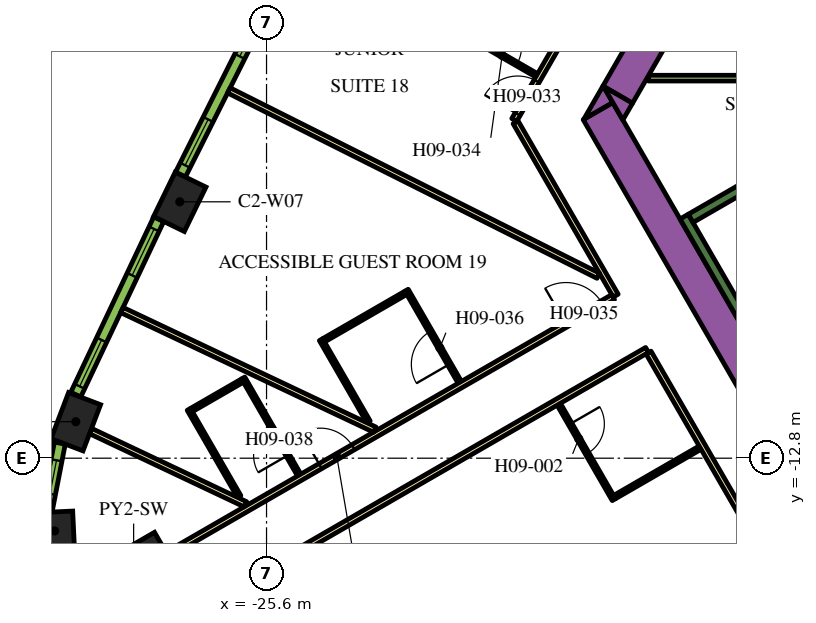
"""IFC4 building model, lengths in metres.
Left out: names, types, materials, properties, quantities, classifications, styles, units other than length and angle.
Written with IfcOpenShell. Run it as: python <this file> out.ifc"""

import sys

from ifc_helpers import new_model, si_unit, direction, frame, frame_2d, origin, origin_2d, place, context, subcontext, project, spatial, polyline, rectangle, outline, extrude, element, fill, save


model = new_model("IFC4")
c1 = context("Model", 3, precision=1e-05, world=origin(), true_north=direction((0.0, 1.0)))
c2 = subcontext(c1, "Body", "Model", "MODEL_VIEW")
j1 = project(units=[si_unit("LENGTHUNIT", "METRE"), si_unit("PLANEANGLEUNIT", "RADIAN")], contexts=[c1])
p1 = place(None, origin())
s1 = spatial("IfcSite", under=j1, at=p1, CompositionType="ELEMENT")
p2 = place(p1, origin())
s2 = spatial("IfcBuilding", under=s1, at=p2, CompositionType="ELEMENT")
p3 = place(p2, frame((0.0, 0.0, 126.6)))
s3 = spatial("IfcBuildingStorey", under=s2, at=p3, CompositionType="ELEMENT", Elevation=126.6)
p4 = place(p3, frame((-29.097, -16.799, 0.0), z_axis=(0.0, 0.0, 1.0), x_axis=(-0.866025403784, -0.5, 0.0)))
e1 = element("IfcColumn", 1, at=p4, inside=s3, PredefinedType="COLUMN", context=c2, shape_type="SweptSolid", body=[
    extrude(rectangle(XDim=3.0, YDim=3.0, at=origin_2d()), origin(), (0.0, 0.0, 1.0), 3.9),
])
for number, where, z_axis, x_axis in (
    (2, (-27.883, -6.054, 0.0), (0.0, 0.0, 1.0), (-0.438, -0.899, 0.0)),
    (3, (-30.619, -11.839, 0.0), (0.0, 0.0, 1.0), (-0.355, -0.935, 0.0)),
):
    element("IfcColumn", number, at=place(p3, frame(where, z_axis=z_axis, x_axis=x_axis)), inside=s3, PredefinedType="COLUMN", context=c2, shape_type="SweptSolid", body=[
        extrude(rectangle(XDim=1.3, YDim=0.9, at=origin_2d()), origin(), (0.0, 0.0, 1.0), 3.9),
    ])
p5 = place(p3, frame((-31.177, -14.714, 0.0), z_axis=(0.0, 0.0, 1.0), x_axis=(0.046756026083, -0.998906338965, 0.0)))
e4 = element("IfcColumn", 4, at=p5, inside=s3, PredefinedType="COLUMN", context=c2, shape_type="SweptSolid", body=[
    extrude(rectangle(XDim=1.0, YDim=1.0, at=origin_2d()), origin(), (0.0, 0.0, 1.0), 3.9),
])
p6 = place(p3, frame((-12.134, -11.883, 0.0), z_axis=(0.0, 0.0, 1.0), x_axis=(-0.500005339912, 0.866022320763, 0.0)))
e5 = element("IfcWall", 5, at=p6, inside=s3, PredefinedType="SOLIDWALL", context=c2, shape_type="SweptSolid", body=[
    extrude(rectangle(XDim=9.488, YDim=0.9, at=frame_2d((4.744, 0.0))), origin(), (0.0, 0.0, 1.0), 3.9),
])
p7 = place(p3, origin())
e6 = element("IfcWall", 6, at=p7, inside=s3, PredefinedType="SOLIDWALL", context=c2, shape_type="SweptSolid", body=[
    extrude(outline(polyline([(-16.489, -3.44), (-17.251, -3.88), (-16.743, -3.0), (-16.489, -3.44)])), origin(), (0.0, 0.0, 1.0), 3.9),
])
p8 = place(p3, frame((-15.118, -1.085, 0.0), z_axis=(0.0, 0.0, 1.0), x_axis=(-0.50006606081, -0.865987260198, 0.0)))
e7 = element("IfcWall", 7, at=p8, inside=s3, PredefinedType="SOLIDWALL", context=c2, shape_type="SweptSolid", body=[
    extrude(rectangle(XDim=2.481, YDim=0.9, at=frame_2d((1.24, 0.0))), origin(), (0.0, 0.0, 1.0), 3.9),
])
e8 = element("IfcWall", 8, at=p7, inside=s3, PredefinedType="SOLIDWALL", context=c2, shape_type="SweptSolid", body=[
    extrude(outline(polyline([(-16.223, -3.9), (-16.732, -3.02), (-15.969, -3.46), (-16.223, -3.9)])), origin(), (0.0, 0.0, 1.0), 3.9),
])
p9 = place(p3, frame((-12.885, -9.431, 0.0), z_axis=(0.0, 0.0, 1.0), x_axis=(-0.500020560727, 0.866013532718, 0.0)))
e9 = element("IfcWall", 9, at=p9, inside=s3, PredefinedType="SOLIDWALL", context=c2, shape_type="SweptSolid", body=[
    extrude(rectangle(XDim=3.45, YDim=0.25, at=frame_2d((1.725, 0.0))), origin(), (0.0, 0.0, 1.0), 3.9),
])
p10 = place(p3, frame((-14.44, -6.49, 0.0), z_axis=(0.0, 0.0, 1.0), x_axis=(0.866022966069, 0.500004222222, 0.0)))
e10 = element("IfcWall", 10, at=p10, inside=s3, PredefinedType="SOLIDWALL", context=c2, shape_type="SweptSolid", body=[
    extrude(rectangle(XDim=6.8, YDim=0.25, at=frame_2d((3.4, 0.0))), origin(), (0.0, 0.0, 1.0), 3.9),
])
p11 = place(p3, frame((-12.915, -2.8, 0.0), z_axis=(0.0, 0.0, 1.0), x_axis=(-1.0, 0.0, 0.0)))
e11 = element("IfcWall", 11, at=p11, inside=s3, PredefinedType="PARTITIONING", context=c2, shape_type="SweptSolid", body=[
    extrude(rectangle(XDim=2.637, YDim=0.15, at=frame_2d((1.318, 0.0))), origin(), (0.0, 0.0, 1.0), 2.75),
])
p12 = place(p3, frame((-19.081, -3.9, 0.0), z_axis=(0.0, 0.0, 1.0), x_axis=(0.499998313975, 0.866026377209, 0.0)))
e12 = element("IfcWall", 12, at=p12, inside=s3, PredefinedType="PARTITIONING", context=c2, shape_type="SweptSolid", body=[
    extrude(rectangle(XDim=25.766, YDim=0.15, at=frame_2d((12.883, 0.0))), origin(), (0.0, 0.0, 1.0), 2.75),
])
p13 = place(p12, frame((19.306, 0.0, 0.0)))
e13 = element("IfcOpeningElement", 13, at=p13, cuts=e12, PredefinedType="OPENING", context=c2, shape_type="SweptSolid", body=[
    extrude(rectangle(XDim=1.0, YDim=2.1, at=frame_2d((0.5, 1.05))), frame((0.0, 0.085, 0.0), z_axis=(0.0, -1.0, 0.0), x_axis=(1.0, 0.0, 0.0)), (0.0, 0.0, 1.0), 0.17),
])
p14 = place(p12, frame((18.0, 0.0, 0.0)))
e14 = element("IfcOpeningElement", 14, at=p14, cuts=e12, PredefinedType="OPENING", context=c2, shape_type="SweptSolid", body=[
    extrude(rectangle(XDim=1.0, YDim=2.1, at=frame_2d((0.5, 1.05))), frame((0.0, 0.085, 0.0), z_axis=(0.0, -1.0, 0.0), x_axis=(1.0, 0.0, 0.0)), (0.0, 0.0, 1.0), 0.17),
])
p15 = place(p12, frame((7.793, 0.0, 0.0)))
e15 = element("IfcOpeningElement", 15, at=p15, cuts=e12, PredefinedType="OPENING", context=c2, shape_type="SweptSolid", body=[
    extrude(rectangle(XDim=0.9, YDim=2.1, at=frame_2d((0.45, 1.05))), frame((0.0, 0.085, 0.0), z_axis=(0.0, -1.0, 0.0), x_axis=(1.0, 0.0, 0.0)), (0.0, 0.0, 1.0), 0.17),
])
p16 = place(p12, frame((4.674, 0.0, 0.0)))
e16 = element("IfcOpeningElement", 16, at=p16, cuts=e12, PredefinedType="OPENING", context=c2, shape_type="SweptSolid", body=[
    extrude(rectangle(XDim=0.9, YDim=2.1, at=frame_2d((0.45, 1.05))), frame((0.0, 0.085, 0.0), z_axis=(0.0, -1.0, 0.0), x_axis=(1.0, 0.0, 0.0)), (0.0, 0.0, 1.0), 0.17),
])
p17 = place(p12, frame((0.18, 0.0, 0.0)))
e17 = element("IfcOpeningElement", 17, at=p17, cuts=e12, PredefinedType="OPENING", context=c2, shape_type="SweptSolid", body=[
    extrude(rectangle(XDim=1.0, YDim=2.1, at=frame_2d((0.5, 1.05))), frame((0.0, 0.085, 0.0), z_axis=(0.0, -1.0, 0.0), x_axis=(1.0, 0.0, 0.0)), (0.0, 0.0, 1.0), 0.17),
])
p18 = place(p3, frame((-16.412, -8.523, 0.0), z_axis=(0.0, 0.0, 1.0), x_axis=(-0.500001929737, 0.866024289647, 0.0)))
e18 = element("IfcWall", 18, at=p18, inside=s3, PredefinedType="PARTITIONING", context=c2, shape_type="SweptSolid", body=[
    extrude(rectangle(XDim=5.268, YDim=0.15, at=frame_2d((2.634, 0.0))), origin(), (0.0, 0.0, 1.0), 2.75),
])
p19 = place(p3, frame((-28.211, -15.335, 0.0), z_axis=(0.0, 0.0, 1.0), x_axis=(0.866025884867, 0.49999916674, 0.0)))
e19 = element("IfcWall", 19, at=p19, inside=s3, PredefinedType="PARTITIONING", context=c2, shape_type="SweptSolid", body=[
    extrude(rectangle(XDim=13.543, YDim=0.15, at=frame_2d((6.772, 0.0))), origin(), (0.0, 0.0, 1.0), 2.75),
])
p20 = place(p19, frame((12.114, 0.0, 0.0)))
e20 = element("IfcOpeningElement", 20, at=p20, cuts=e19, PredefinedType="OPENING", context=c2, shape_type="SweptSolid", body=[
    extrude(rectangle(XDim=1.1, YDim=2.1, at=frame_2d((0.55, 1.05))), frame((0.0, 0.085, 0.0), z_axis=(0.0, -1.0, 0.0), x_axis=(1.0, 0.0, 0.0)), (0.0, 0.0, 1.0), 0.17),
])
p21 = place(p19, frame((4.65, 0.0, 0.0)))
e21 = element("IfcOpeningElement", 21, at=p21, cuts=e19, PredefinedType="OPENING", context=c2, shape_type="SweptSolid", body=[
    extrude(rectangle(XDim=1.0, YDim=2.1, at=frame_2d((0.5, 1.05))), frame((0.0, 0.085, 0.0), z_axis=(0.0, -1.0, 0.0), x_axis=(1.0, 0.0, 0.0)), (0.0, 0.0, 1.0), 0.17),
])
p22 = place(p3, frame((-15.587, -9.952, 0.0), z_axis=(0.0, 0.0, 1.0), x_axis=(-0.866017869832, -0.500013048961, 0.0)))
e22 = element("IfcWall", 22, at=p22, inside=s3, PredefinedType="PARTITIONING", context=c2, shape_type="SweptSolid", body=[
    extrude(rectangle(XDim=13.624, YDim=0.15, at=frame_2d((6.812, 0.0))), origin(), (0.0, 0.0, 1.0), 2.75),
])
p23 = place(p22, frame((12.344, 0.0, 0.0)))
e23 = element("IfcOpeningElement", 23, at=p23, cuts=e22, PredefinedType="OPENING", context=c2, shape_type="SweptSolid", body=[
    extrude(rectangle(XDim=1.1, YDim=2.1, at=frame_2d((0.55, 1.05))), frame((0.0, 0.085, 0.0), z_axis=(0.0, -1.0, 0.0), x_axis=(1.0, 0.0, 0.0)), (0.0, 0.0, 1.0), 0.17),
])
p24 = place(p3, frame((-12.918, -14.575, 0.0), z_axis=(0.0, 0.0, 1.0), x_axis=(-0.500009150678, 0.866020120573, 0.0)))
e24 = element("IfcWall", 24, at=p24, inside=s3, PredefinedType="PARTITIONING", context=c2, shape_type="SweptSolid", body=[
    extrude(rectangle(XDim=5.258, YDim=0.15, at=frame_2d((2.629, 0.0))), origin(), (0.0, 0.0, 1.0), 2.75),
])
p25 = place(p3, frame((-30.231, -12.085, 0.0), z_axis=(0.0, 0.0, 1.0), x_axis=(0.904001132572, -0.427530060122, 0.0)))
e25 = element("IfcWall", 25, at=p25, inside=s3, PredefinedType="PARTITIONING", context=c2, shape_type="SweptSolid", body=[
    extrude(rectangle(XDim=4.51, YDim=0.15, at=frame_2d((2.255, 0.0))), origin(), (0.0, 0.0, 1.0), 2.75),
])
p26 = place(p3, frame((-29.406, -8.901, 0.0), z_axis=(0.0, 0.0, 1.0), x_axis=(0.904002363742, -0.427527456836, 0.0)))
e26 = element("IfcWall", 26, at=p26, inside=s3, PredefinedType="PARTITIONING", context=c2, shape_type="SweptSolid", body=[
    extrude(rectangle(XDim=7.362, YDim=0.15, at=frame_2d((3.681, 0.0))), origin(), (0.0, 0.0, 1.0), 2.75),
])
p27 = place(p3, frame((-26.591, -3.122, 0.0), z_axis=(0.0, 0.0, 1.0), x_axis=(0.893766213273, -0.448533115847, 0.0)))
e27 = element("IfcWall", 27, at=p27, inside=s3, PredefinedType="PARTITIONING", context=c2, shape_type="SweptSolid", body=[
    extrude(rectangle(XDim=10.875, YDim=0.15, at=frame_2d((5.438, 0.0))), origin(), (0.0, 0.0, 1.0), 2.75),
])
p28 = place(p3, frame((-17.91, -11.38, 0.0), z_axis=(0.0, 0.0, 1.0), x_axis=(0.499987231761, -0.866032775405, 0.0)))
e28 = element("IfcWall", 28, at=p28, inside=s3, PredefinedType="PARTITIONING", context=c2, shape_type="SweptSolid", body=[
    extrude(rectangle(XDim=2.9, YDim=0.1, at=frame_2d((1.45, 0.0))), origin(), (0.0, 0.0, 1.0), 2.75),
])
p29 = place(p28, frame((0.6, 0.0, 0.0)))
e29 = element("IfcOpeningElement", 29, at=p29, cuts=e28, PredefinedType="OPENING", context=c2, shape_type="SweptSolid", body=[
    extrude(rectangle(XDim=0.9, YDim=2.1, at=frame_2d((0.45, 1.05))), frame((0.0, 0.06, 0.0), z_axis=(0.0, -1.0, 0.0), x_axis=(1.0, 0.0, 0.0)), (0.0, 0.0, 1.0), 0.12),
])
p30 = place(p3, frame((-16.442, -13.823, 0.0), z_axis=(0.0, 0.0, 1.0), x_axis=(0.866021400173, 0.500006934395, 0.0)))
e30 = element("IfcWall", 30, at=p30, inside=s3, PredefinedType="PARTITIONING", context=c2, shape_type="SweptSolid", body=[
    extrude(rectangle(XDim=2.6, YDim=0.1, at=frame_2d((1.3, 0.0))), origin(), (0.0, 0.0, 1.0), 2.75),
])
p31 = place(p3, frame((-20.829, -1.377, 0.0), z_axis=(0.0, 0.0, 1.0), x_axis=(0.866036505625, -0.499980770555, 0.0)))
e31 = element("IfcWall", 31, at=p31, inside=s3, PredefinedType="PARTITIONING", context=c2, shape_type="SweptSolid", body=[
    extrude(rectangle(XDim=2.7, YDim=0.1, at=frame_2d((1.35, 0.0))), origin(), (0.0, 0.0, 1.0), 2.75),
])
p32 = place(p31, frame((1.2, 0.0, 0.0)))
e32 = element("IfcOpeningElement", 32, at=p32, cuts=e31, PredefinedType="OPENING", context=c2, shape_type="SweptSolid", body=[
    extrude(rectangle(XDim=0.9, YDim=2.1, at=frame_2d((0.45, 1.05))), frame((0.0, 0.06, 0.0), z_axis=(0.0, -1.0, 0.0), x_axis=(1.0, 0.0, 0.0)), (0.0, 0.0, 1.0), 0.12),
])
p33 = place(p3, frame((-20.515, -10.805, 0.0), z_axis=(0.0, 0.0, 1.0), x_axis=(-0.49994636267, 0.866056369097, 0.0)))
e33 = element("IfcWall", 33, at=p33, inside=s3, PredefinedType="PARTITIONING", context=c2, shape_type="SweptSolid", body=[
    extrude(rectangle(XDim=2.8, YDim=0.1, at=frame_2d((1.4, 0.0))), origin(), (0.0, 0.0, 1.0), 2.75),
])
p34 = place(p33, frame((0.55, 0.0, 0.0)))
e34 = element("IfcOpeningElement", 34, at=p34, cuts=e33, PredefinedType="OPENING", context=c2, shape_type="SweptSolid", body=[
    extrude(rectangle(XDim=1.0, YDim=2.1, at=frame_2d((0.5, 1.05))), frame((0.0, 0.06, 0.0), z_axis=(0.0, -1.0, 0.0), x_axis=(1.0, 0.0, 0.0)), (0.0, 0.0, 1.0), 0.12),
])
for number, where, z_axis, x_axis in (
    (35, (-21.933, -8.448, 0.0), (0.0, 0.0, 1.0), (-0.866, -0.5, 0.0)),
    (36, (-22.916, -11.845, 0.0), (0.0, 0.0, 1.0), (-0.5, 0.866, 0.0)),
):
    element("IfcWall", number, at=place(p3, frame(where, z_axis=z_axis, x_axis=x_axis)), inside=s3, PredefinedType="PARTITIONING", context=c2, shape_type="SweptSolid", body=[
        extrude(rectangle(XDim=2.5, YDim=0.1, at=frame_2d((1.25, 0.0))), origin(), (0.0, 0.0, 1.0), 2.75),
    ])
p35 = place(p3, frame((-24.74, -13.244, 0.0), z_axis=(0.0, 0.0, 1.0), x_axis=(-0.500037662692, 0.866003658127, 0.0)))
e37 = element("IfcWall", 37, at=p35, inside=s3, PredefinedType="PARTITIONING", context=c2, shape_type="SweptSolid", body=[
    extrude(rectangle(XDim=2.95, YDim=0.1, at=frame_2d((1.475, 0.0))), origin(), (0.0, 0.0, 1.0), 2.75),
])
p36 = place(p35, frame((0.6, 0.0, 0.0)))
e38 = element("IfcOpeningElement", 38, at=p36, cuts=e37, PredefinedType="OPENING", context=c2, shape_type="SweptSolid", body=[
    extrude(rectangle(XDim=0.9, YDim=2.1, at=frame_2d((0.45, 1.05))), frame((0.0, 0.06, 0.0), z_axis=(0.0, -1.0, 0.0), x_axis=(1.0, 0.0, 0.0)), (0.0, 0.0, 1.0), 0.12),
])
p37 = place(p3, frame((-26.233, -10.758, 0.0), z_axis=(0.0, 0.0, 1.0), x_axis=(-0.866043940782, -0.499967891604, 0.0)))
e39 = element("IfcWall", 39, at=p37, inside=s3, PredefinedType="PARTITIONING", context=c2, shape_type="SweptSolid", body=[
    extrude(rectangle(XDim=1.55, YDim=0.1, at=frame_2d((0.775, 0.0))), origin(), (0.0, 0.0, 1.0), 2.75),
])
p38 = place(p3, frame((-26.319, -13.81, 0.0), z_axis=(0.0, 0.0, 1.0), x_axis=(-0.499953715521, 0.866052124492, 0.0)))
e40 = element("IfcWall", 40, at=p38, inside=s3, PredefinedType="PARTITIONING", context=c2, shape_type="SweptSolid", body=[
    extrude(rectangle(XDim=2.65, YDim=0.1, at=frame_2d((1.325, 0.0))), origin(), (0.0, 0.0, 1.0), 2.75),
])
p39 = place(p3, frame((-25.576, -0.778, 0.0), z_axis=(0.0, 0.0, 1.0), x_axis=(-0.448534297211, -0.893765620409, 0.0)))
e41 = element("IfcWall", 41, at=p39, inside=s3, PredefinedType="SOLIDWALL", context=c2, shape_type="SweptSolid", body=[
    extrude(rectangle(XDim=5.1, YDim=0.29, at=frame_2d((2.55, 0.0))), origin(), (0.0, 0.0, 1.0), 3.65),
])
p40 = place(p39, frame((0.272, 0.0, 0.9)))
e42 = element("IfcOpeningElement", 42, at=p40, cuts=e41, PredefinedType="OPENING", context=c2, shape_type="SweptSolid", body=[
    extrude(rectangle(XDim=1.35, YDim=2.15, at=frame_2d((0.675, 1.075))), frame((0.0, 0.155, 0.0), z_axis=(0.0, -1.0, 0.0), x_axis=(1.0, 0.0, 0.0)), (0.0, 0.0, 1.0), 0.31),
])
p41 = place(p39, frame((3.478, 0.0, 0.9)))
e43 = element("IfcOpeningElement", 43, at=p41, cuts=e41, PredefinedType="OPENING", context=c2, shape_type="SweptSolid", body=[
    extrude(rectangle(XDim=1.35, YDim=2.15, at=frame_2d((0.675, 1.075))), frame((0.0, 0.155, 0.0), z_axis=(0.0, -1.0, 0.0), x_axis=(1.0, 0.0, 0.0)), (0.0, 0.0, 1.0), 0.31),
])
p42 = place(p3, frame((-28.436, -6.511, 0.0), z_axis=(0.0, 0.0, 1.0), x_axis=(-0.427543726596, -0.903994669148, 0.0)))
e44 = element("IfcWall", 44, at=p42, inside=s3, PredefinedType="SOLIDWALL", context=c2, shape_type="SweptSolid", body=[
    extrude(rectangle(XDim=5.107, YDim=0.29, at=frame_2d((2.553, 0.0))), origin(), (0.0, 0.0, 1.0), 3.65),
])
p43 = place(p42, frame((0.285, 0.0, 0.9)))
e45 = element("IfcOpeningElement", 45, at=p43, cuts=e44, PredefinedType="OPENING", context=c2, shape_type="SweptSolid", body=[
    extrude(rectangle(XDim=1.35, YDim=2.15, at=frame_2d((0.675, 1.075))), frame((0.0, 0.155, 0.0), z_axis=(0.0, -1.0, 0.0), x_axis=(1.0, 0.0, 0.0)), (0.0, 0.0, 1.0), 0.31),
])
p44 = place(p42, frame((3.516, 0.0, 0.9)))
e46 = element("IfcOpeningElement", 46, at=p44, cuts=e44, PredefinedType="OPENING", context=c2, shape_type="SweptSolid", body=[
    extrude(rectangle(XDim=1.35, YDim=2.15, at=frame_2d((0.675, 1.075))), frame((0.0, 0.155, 0.0), z_axis=(0.0, -1.0, 0.0), x_axis=(1.0, 0.0, 0.0)), (0.0, 0.0, 1.0), 0.31),
])
p45 = place(p3, frame((-31.039, -12.403, 0.0), z_axis=(0.0, 0.0, 1.0), x_axis=(-0.190409913989, -0.981704672829, 0.0)))
e47 = element("IfcWall", 47, at=p45, inside=s3, PredefinedType="SOLIDWALL", context=c2, shape_type="SweptSolid", body=[
    extrude(rectangle(XDim=1.819, YDim=0.29, at=frame_2d((0.91, 0.0))), origin(), (0.0, 0.0, 1.0), 3.65),
])
p46 = place(p45, frame((0.46, 0.0, 0.9)))
e48 = element("IfcOpeningElement", 48, at=p46, cuts=e47, PredefinedType="OPENING", context=c2, shape_type="SweptSolid", body=[
    extrude(rectangle(XDim=0.9, YDim=2.15, at=frame_2d((0.45, 1.075))), frame((0.0, 0.155, 0.0), z_axis=(0.0, -1.0, 0.0), x_axis=(1.0, 0.0, 0.0)), (0.0, 0.0, 1.0), 0.31),
])
p47 = place(p29, origin())
e49 = element("IfcDoor", 49, at=p47, inside=s3, OperationType="SINGLE_SWING_LEFT", PredefinedType="DOOR", context=c2, shape_type="SweptSolid", body=[
    extrude(rectangle(XDim=0.9, YDim=2.1, at=frame_2d((0.45, 1.05))), frame((0.0, 0.025, 0.0), z_axis=(0.0, -1.0, 0.0), x_axis=(1.0, 0.0, 0.0)), (0.0, 0.0, 1.0), 0.05),
])
fill(e29, e49)
p48 = place(p17, origin())
e50 = element("IfcDoor", 50, at=p48, inside=s3, OperationType="SINGLE_SWING_LEFT", PredefinedType="DOOR", context=c2, shape_type="SweptSolid", body=[
    extrude(rectangle(XDim=1.0, YDim=2.1, at=frame_2d((0.5, 1.05))), frame((0.0, 0.025, 0.0), z_axis=(0.0, -1.0, 0.0), x_axis=(1.0, 0.0, 0.0)), (0.0, 0.0, 1.0), 0.05),
])
fill(e17, e50)
p49 = place(p32, origin())
e51 = element("IfcDoor", 51, at=p49, inside=s3, OperationType="SINGLE_SWING_RIGHT", PredefinedType="DOOR", context=c2, shape_type="SweptSolid", body=[
    extrude(rectangle(XDim=0.9, YDim=2.1, at=frame_2d((0.45, 1.05))), frame((0.0, 0.025, 0.0), z_axis=(0.0, -1.0, 0.0), x_axis=(1.0, 0.0, 0.0)), (0.0, 0.0, 1.0), 0.05),
])
fill(e32, e51)
p50 = place(p20, origin())
e52 = element("IfcDoor", 52, at=p50, inside=s3, OperationType="SINGLE_SWING_RIGHT", PredefinedType="DOOR", context=c2, shape_type="SweptSolid", body=[
    extrude(rectangle(XDim=1.1, YDim=2.1, at=frame_2d((0.55, 1.05))), frame((0.0, 0.025, 0.0), z_axis=(0.0, -1.0, 0.0), x_axis=(1.0, 0.0, 0.0)), (0.0, 0.0, 1.0), 0.05),
])
fill(e20, e52)
p51 = place(p34, origin())
e53 = element("IfcDoor", 53, at=p51, inside=s3, OperationType="SINGLE_SWING_LEFT", PredefinedType="DOOR", context=c2, shape_type="SweptSolid", body=[
    extrude(rectangle(XDim=1.0, YDim=2.1, at=frame_2d((0.5, 1.05))), frame((0.0, 0.025, 0.0), z_axis=(0.0, -1.0, 0.0), x_axis=(1.0, 0.0, 0.0)), (0.0, 0.0, 1.0), 0.05),
])
fill(e34, e53)
p52 = place(p21, origin())
e54 = element("IfcDoor", 54, at=p52, inside=s3, OperationType="SINGLE_SWING_RIGHT", PredefinedType="DOOR", context=c2, shape_type="SweptSolid", body=[
    extrude(rectangle(XDim=1.0, YDim=2.1, at=frame_2d((0.5, 1.05))), frame((0.0, 0.025, 0.0), z_axis=(0.0, -1.0, 0.0), x_axis=(1.0, 0.0, 0.0)), (0.0, 0.0, 1.0), 0.05),
])
fill(e21, e54)
p53 = place(p36, origin())
e55 = element("IfcDoor", 55, at=p53, inside=s3, OperationType="SINGLE_SWING_LEFT", PredefinedType="DOOR", context=c2, shape_type="SweptSolid", body=[
    extrude(rectangle(XDim=0.9, YDim=2.1, at=frame_2d((0.45, 1.05))), frame((0.0, 0.025, 0.0), z_axis=(0.0, -1.0, 0.0), x_axis=(1.0, 0.0, 0.0)), (0.0, 0.0, 1.0), 0.05),
])
fill(e38, e55)
p54 = place(p40, origin())
e56 = element("IfcWindow", 56, at=p54, inside=s3, PartitioningType="DOUBLE_PANEL_VERTICAL", PredefinedType="WINDOW", context=c2, shape_type="SweptSolid", body=[
    extrude(rectangle(XDim=1.35, YDim=2.15, at=frame_2d((0.675, 1.075))), frame((0.0, 0.015, 0.0), z_axis=(0.0, -1.0, 0.0), x_axis=(1.0, 0.0, 0.0)), (0.0, 0.0, 1.0), 0.06),
])
fill(e42, e56)
p55 = place(p41, origin())
e57 = element("IfcWindow", 57, at=p55, inside=s3, PartitioningType="DOUBLE_PANEL_VERTICAL", PredefinedType="WINDOW", context=c2, shape_type="SweptSolid", body=[
    extrude(rectangle(XDim=1.35, YDim=2.15, at=frame_2d((0.675, 1.075))), frame((0.0, 0.015, 0.0), z_axis=(0.0, -1.0, 0.0), x_axis=(1.0, 0.0, 0.0)), (0.0, 0.0, 1.0), 0.06),
])
fill(e43, e57)
p56 = place(p43, origin())
e58 = element("IfcWindow", 58, at=p56, inside=s3, PartitioningType="DOUBLE_PANEL_VERTICAL", PredefinedType="WINDOW", context=c2, shape_type="SweptSolid", body=[
    extrude(rectangle(XDim=1.35, YDim=2.15, at=frame_2d((0.675, 1.075))), frame((0.0, 0.015, 0.0), z_axis=(0.0, -1.0, 0.0), x_axis=(1.0, 0.0, 0.0)), (0.0, 0.0, 1.0), 0.06),
])
fill(e45, e58)
p57 = place(p44, origin())
e59 = element("IfcWindow", 59, at=p57, inside=s3, PartitioningType="DOUBLE_PANEL_VERTICAL", PredefinedType="WINDOW", context=c2, shape_type="SweptSolid", body=[
    extrude(rectangle(XDim=1.35, YDim=2.15, at=frame_2d((0.675, 1.075))), frame((0.0, 0.015, 0.0), z_axis=(0.0, -1.0, 0.0), x_axis=(1.0, 0.0, 0.0)), (0.0, 0.0, 1.0), 0.06),
])
fill(e46, e59)
p58 = place(p46, origin())
e60 = element("IfcWindow", 60, at=p58, inside=s3, PartitioningType="SINGLE_PANEL", PredefinedType="WINDOW", context=c2, shape_type="SweptSolid", body=[
    extrude(rectangle(XDim=0.9, YDim=2.15, at=frame_2d((0.45, 1.075))), frame((0.0, 0.015, 0.0), z_axis=(0.0, -1.0, 0.0), x_axis=(1.0, 0.0, 0.0)), (0.0, 0.0, 1.0), 0.06),
])
fill(e48, e60)
save(model, sys.argv[1])
